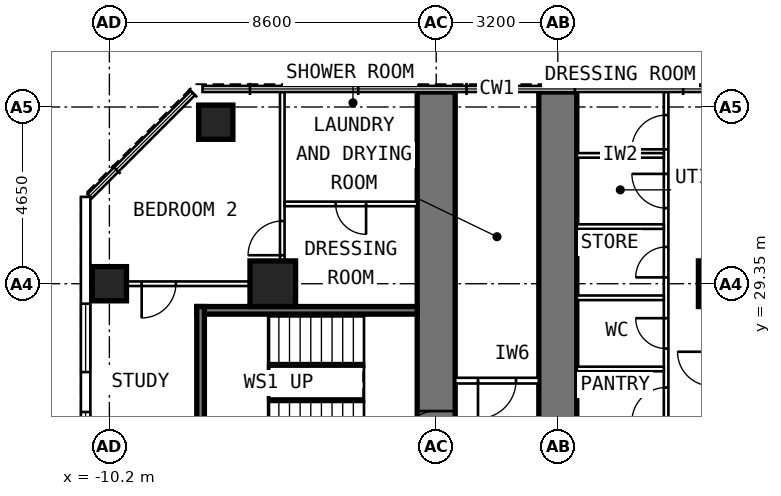
"""IFC4 building model, lengths in metres.
Left out: names, types, materials, properties, quantities, classifications, styles, units other than length and angle.
Written with IfcOpenShell. Run it as: python <this file> out.ifc"""

import sys

from ifc_helpers import new_model, si_unit, direction, frame, frame_2d, origin, origin_2d, place, context, subcontext, project, spatial, rectangle, extrude, element, fill, save


model = new_model("IFC4")
c1 = context("Model", 3, precision=1e-05, world=origin(), true_north=direction((0.0, 1.0)))
c2 = subcontext(c1, "Body", "Model", "MODEL_VIEW")
j1 = project(units=[si_unit("LENGTHUNIT", "METRE"), si_unit("PLANEANGLEUNIT", "RADIAN")], contexts=[c1])
p1 = place(None, origin())
s1 = spatial("IfcSite", under=j1, at=p1, CompositionType="ELEMENT")
p2 = place(p1, origin())
s2 = spatial("IfcBuilding", under=s1, at=p2, CompositionType="ELEMENT")
p3 = place(p2, frame((0.0, 0.0, 102.4)))
s3 = spatial("IfcBuildingStorey", under=s2, at=p3, CompositionType="ELEMENT", Elevation=102.4)
for number, where, z_axis, x_axis in (
    (1, (-10.2, 29.35, 0.0), (0.0, 0.0, 1.0), (0.0, 1.0, 0.0)),
    (2, (-7.4, 33.6, 0.0), (0.0, 0.0, 1.0), (0.0, 1.0, 0.0)),
):
    element("IfcColumn", number, at=place(p3, frame(where, z_axis=z_axis, x_axis=x_axis)), inside=s3, PredefinedType="COLUMN", context=c2, shape_type="SweptSolid", body=[
        extrude(rectangle(XDim=0.9, YDim=0.9, at=origin_2d()), origin(), (0.0, 0.0, 1.0), 3.6),
    ])
for number, where, z_axis, x_axis in (
    (3, (-5.9, 29.35, 0.0), (0.0, 0.0, 1.0), (0.0, 1.0, 0.0)),
    (4, (5.9, 29.35, 0.0), (0.0, 0.0, 1.0), (0.0, 1.0, 0.0)),
):
    element("IfcColumn", number, at=place(p3, frame(where, z_axis=z_axis, x_axis=x_axis)), inside=s3, PredefinedType="COLUMN", context=c2, shape_type="SweptSolid", body=[
        extrude(rectangle(XDim=1.2, YDim=1.2, at=origin_2d()), origin(), (0.0, 0.0, 1.0), 3.6),
    ])
p4 = place(p3, frame((-1.6, 23.65, 0.0), z_axis=(0.0, 0.0, 1.0), x_axis=(0.0, 1.0, 0.0)))
e5 = element("IfcWall", 5, at=p4, inside=s3, PredefinedType="SHEAR", context=c2, shape_type="SweptSolid", body=[
    extrude(rectangle(XDim=10.745, YDim=1.0, at=frame_2d((5.373, 0.0))), origin(), (0.0, 0.0, 1.0), 3.6),
])
p5 = place(p4, frame((1.35, 0.0, 0.0)))
e6 = element("IfcOpeningElement", 6, at=p5, cuts=e5, PredefinedType="OPENING", context=c2, shape_type="SweptSolid", body=[
    extrude(rectangle(XDim=1.0, YDim=2.1, at=frame_2d((0.5, 1.05))), frame((0.0, 0.512, 0.0), z_axis=(0.0, -1.0, 0.0), x_axis=(1.0, 0.0, 0.0)), (0.0, 0.0, 1.0), 1.024),
])
p6 = place(p3, frame((1.6, 23.65, 0.0), z_axis=(0.0, 0.0, 1.0), x_axis=(0.0, 1.0, 0.0)))
e7 = element("IfcWall", 7, at=p6, inside=s3, PredefinedType="SHEAR", context=c2, shape_type="SweptSolid", body=[
    extrude(rectangle(XDim=10.745, YDim=1.0, at=frame_2d((5.373, 0.0))), origin(), (0.0, 0.0, 1.0), 3.6),
])
p7 = place(p3, frame((-10.825, 6.148, 0.0), z_axis=(0.0, 0.0, 1.0), x_axis=(0.0, 1.0, 0.0)))
e8 = element("IfcWall", 8, at=p7, inside=s3, PredefinedType="SOLIDWALL", context=c2, shape_type="SweptSolid", body=[
    extrude(rectangle(XDim=25.487, YDim=0.25, at=frame_2d((12.744, 0.0))), origin(), (0.0, 0.0, 1.0), 3.35),
])
p8 = place(p7, frame((0.927, 0.0, 0.8)))
e9 = element("IfcOpeningElement", 9, at=p8, cuts=e8, PredefinedType="OPENING", context=c2, shape_type="SweptSolid", body=[
    extrude(rectangle(XDim=1.8, YDim=1.8, at=frame_2d((0.9, 0.9))), frame((0.0, 0.137, 0.0), z_axis=(0.0, -1.0, 0.0), x_axis=(1.0, 0.0, 0.0)), (0.0, 0.0, 1.0), 0.274),
])
p9 = place(p7, frame((3.777, 0.0, 0.8)))
e10 = element("IfcOpeningElement", 10, at=p9, cuts=e8, PredefinedType="OPENING", context=c2, shape_type="SweptSolid", body=[
    extrude(rectangle(XDim=1.8, YDim=1.8, at=frame_2d((0.9, 0.9))), frame((0.0, 0.137, 0.0), z_axis=(0.0, -1.0, 0.0), x_axis=(1.0, 0.0, 0.0)), (0.0, 0.0, 1.0), 0.274),
])
p10 = place(p7, frame((6.627, 0.0, 0.8)))
e11 = element("IfcOpeningElement", 11, at=p10, cuts=e8, PredefinedType="OPENING", context=c2, shape_type="SweptSolid", body=[
    extrude(rectangle(XDim=1.8, YDim=1.8, at=frame_2d((0.9, 0.9))), frame((0.0, 0.137, 0.0), z_axis=(0.0, -1.0, 0.0), x_axis=(1.0, 0.0, 0.0)), (0.0, 0.0, 1.0), 0.274),
])
p11 = place(p7, frame((9.477, 0.0, 0.8)))
e12 = element("IfcOpeningElement", 12, at=p11, cuts=e8, PredefinedType="OPENING", context=c2, shape_type="SweptSolid", body=[
    extrude(rectangle(XDim=1.8, YDim=1.8, at=frame_2d((0.9, 0.9))), frame((0.0, 0.137, 0.0), z_axis=(0.0, -1.0, 0.0), x_axis=(1.0, 0.0, 0.0)), (0.0, 0.0, 1.0), 0.274),
])
p12 = place(p7, frame((12.327, 0.0, 0.8)))
e13 = element("IfcOpeningElement", 13, at=p12, cuts=e8, PredefinedType="OPENING", context=c2, shape_type="SweptSolid", body=[
    extrude(rectangle(XDim=1.8, YDim=1.8, at=frame_2d((0.9, 0.9))), frame((0.0, 0.137, 0.0), z_axis=(0.0, -1.0, 0.0), x_axis=(1.0, 0.0, 0.0)), (0.0, 0.0, 1.0), 0.274),
])
p13 = place(p7, frame((15.177, 0.0, 0.8)))
e14 = element("IfcOpeningElement", 14, at=p13, cuts=e8, PredefinedType="OPENING", context=c2, shape_type="SweptSolid", body=[
    extrude(rectangle(XDim=1.8, YDim=1.8, at=frame_2d((0.9, 0.9))), frame((0.0, 0.137, 0.0), z_axis=(0.0, -1.0, 0.0), x_axis=(1.0, 0.0, 0.0)), (0.0, 0.0, 1.0), 0.274),
])
p14 = place(p7, frame((18.027, 0.0, 0.8)))
e15 = element("IfcOpeningElement", 15, at=p14, cuts=e8, PredefinedType="OPENING", context=c2, shape_type="SweptSolid", body=[
    extrude(rectangle(XDim=1.8, YDim=1.8, at=frame_2d((0.9, 0.9))), frame((0.0, 0.137, 0.0), z_axis=(0.0, -1.0, 0.0), x_axis=(1.0, 0.0, 0.0)), (0.0, 0.0, 1.0), 0.274),
])
p15 = place(p7, frame((20.877, 0.0, 0.8)))
e16 = element("IfcOpeningElement", 16, at=p15, cuts=e8, PredefinedType="OPENING", context=c2, shape_type="SweptSolid", body=[
    extrude(rectangle(XDim=1.8, YDim=1.8, at=frame_2d((0.9, 0.9))), frame((0.0, 0.137, 0.0), z_axis=(0.0, -1.0, 0.0), x_axis=(1.0, 0.0, 0.0)), (0.0, 0.0, 1.0), 0.274),
])
p16 = place(p3, frame((-5.71, 29.35, 0.0), z_axis=(0.0, 0.0, 1.0), x_axis=(-1.0, 0.0, 0.0)))
e17 = element("IfcWall", 17, at=p16, inside=s3, PredefinedType="PARTITIONING", context=c2, shape_type="SweptSolid", body=[
    extrude(rectangle(XDim=4.99, YDim=0.12, at=frame_2d((2.495, 0.0))), origin(), (0.0, 0.0, 1.0), 2.45),
])
p17 = place(p16, frame((2.74, 0.0, 0.0)))
e18 = element("IfcOpeningElement", 18, at=p17, cuts=e17, PredefinedType="OPENING", context=c2, shape_type="SweptSolid", body=[
    extrude(rectangle(XDim=0.9, YDim=2.1, at=frame_2d((0.45, 1.05))), frame((0.0, 0.072, 0.0), z_axis=(0.0, -1.0, 0.0), x_axis=(1.0, 0.0, 0.0)), (0.0, 0.0, 1.0), 0.144),
])
p18 = place(p3, frame((-5.65, 28.95, 0.0), z_axis=(0.0, 0.0, 1.0), x_axis=(0.0, 1.0, 0.0)))
e19 = element("IfcWall", 19, at=p18, inside=s3, PredefinedType="PARTITIONING", context=c2, shape_type="SweptSolid", body=[
    extrude(rectangle(XDim=5.445, YDim=0.12, at=frame_2d((2.723, 0.0))), origin(), (0.0, 0.0, 1.0), 3.35),
])
p19 = place(p18, frame((1.15, 0.0, 0.0)))
e20 = element("IfcOpeningElement", 20, at=p19, cuts=e19, PredefinedType="OPENING", context=c2, shape_type="SweptSolid", body=[
    extrude(rectangle(XDim=0.9, YDim=2.1, at=frame_2d((0.45, 1.05))), frame((0.0, 0.072, 0.0), z_axis=(0.0, -1.0, 0.0), x_axis=(1.0, 0.0, 0.0)), (0.0, 0.0, 1.0), 0.144),
])
p20 = place(p3, frame((-2.1, 31.45, 0.0), z_axis=(0.0, 0.0, 1.0), x_axis=(-1.0, 0.0, 0.0)))
e21 = element("IfcWall", 21, at=p20, inside=s3, PredefinedType="PARTITIONING", context=c2, shape_type="SweptSolid", body=[
    extrude(rectangle(XDim=3.49, YDim=0.12, at=frame_2d((1.745, 0.0))), origin(), (0.0, 0.0, 1.0), 3.35),
])
p21 = place(p20, frame((1.345, 0.0, 0.0)))
e22 = element("IfcOpeningElement", 22, at=p21, cuts=e21, PredefinedType="OPENING", context=c2, shape_type="SweptSolid", body=[
    extrude(rectangle(XDim=0.8, YDim=2.1, at=frame_2d((0.4, 1.05))), frame((0.0, 0.072, 0.0), z_axis=(0.0, -1.0, 0.0), x_axis=(1.0, 0.0, 0.0)), (0.0, 0.0, 1.0), 0.144),
])
p22 = place(p3, frame((4.45, 18.05, 0.0), z_axis=(0.0, 0.0, 1.0), x_axis=(0.0, 1.0, 0.0)))
e23 = element("IfcWall", 23, at=p22, inside=s3, PredefinedType="PARTITIONING", context=c2, shape_type="SweptSolid", body=[
    extrude(rectangle(XDim=16.345, YDim=0.12, at=frame_2d((8.172, 0.0))), origin(), (0.0, 0.0, 1.0), 3.35),
])
p23 = place(p22, frame((0.75, 0.0, 0.0)))
e24 = element("IfcOpeningElement", 24, at=p23, cuts=e23, PredefinedType="OPENING", context=c2, shape_type="SweptSolid", body=[
    extrude(rectangle(XDim=0.9, YDim=2.1, at=frame_2d((0.45, 1.05))), frame((0.0, 0.072, 0.0), z_axis=(0.0, -1.0, 0.0), x_axis=(1.0, 0.0, 0.0)), (0.0, 0.0, 1.0), 0.144),
])
p24 = place(p22, frame((3.505, 0.0, 0.0)))
e25 = element("IfcOpeningElement", 25, at=p24, cuts=e23, PredefinedType="OPENING", context=c2, shape_type="SweptSolid", body=[
    extrude(rectangle(XDim=0.8, YDim=2.1, at=frame_2d((0.4, 1.05))), frame((0.0, 0.072, 0.0), z_axis=(0.0, -1.0, 0.0), x_axis=(1.0, 0.0, 0.0)), (0.0, 0.0, 1.0), 0.144),
])
p25 = place(p22, frame((5.847, 0.0, 0.0)))
e26 = element("IfcOpeningElement", 26, at=p25, cuts=e23, PredefinedType="OPENING", context=c2, shape_type="SweptSolid", body=[
    extrude(rectangle(XDim=0.8, YDim=2.1, at=frame_2d((0.4, 1.05))), frame((0.0, 0.072, 0.0), z_axis=(0.0, -1.0, 0.0), x_axis=(1.0, 0.0, 0.0)), (0.0, 0.0, 1.0), 0.144),
])
p26 = place(p22, frame((7.67, 0.0, 0.0)))
e27 = element("IfcOpeningElement", 27, at=p26, cuts=e23, PredefinedType="OPENING", context=c2, shape_type="SweptSolid", body=[
    extrude(rectangle(XDim=0.9, YDim=2.1, at=frame_2d((0.45, 1.05))), frame((0.0, 0.072, 0.0), z_axis=(0.0, -1.0, 0.0), x_axis=(1.0, 0.0, 0.0)), (0.0, 0.0, 1.0), 0.144),
])
p27 = place(p22, frame((9.593, 0.0, 0.0)))
e28 = element("IfcOpeningElement", 28, at=p27, cuts=e23, PredefinedType="OPENING", context=c2, shape_type="SweptSolid", body=[
    extrude(rectangle(XDim=0.8, YDim=2.1, at=frame_2d((0.4, 1.05))), frame((0.0, 0.072, 0.0), z_axis=(0.0, -1.0, 0.0), x_axis=(1.0, 0.0, 0.0)), (0.0, 0.0, 1.0), 0.144),
])
p28 = place(p22, frame((11.467, 0.0, 0.0)))
e29 = element("IfcOpeningElement", 29, at=p28, cuts=e23, PredefinedType="OPENING", context=c2, shape_type="SweptSolid", body=[
    extrude(rectangle(XDim=0.8, YDim=2.1, at=frame_2d((0.4, 1.05))), frame((0.0, 0.072, 0.0), z_axis=(0.0, -1.0, 0.0), x_axis=(1.0, 0.0, 0.0)), (0.0, 0.0, 1.0), 0.144),
])
p29 = place(p22, frame((13.29, 0.0, 0.0)))
e30 = element("IfcOpeningElement", 30, at=p29, cuts=e23, PredefinedType="OPENING", context=c2, shape_type="SweptSolid", body=[
    extrude(rectangle(XDim=0.9, YDim=2.1, at=frame_2d((0.45, 1.05))), frame((0.0, 0.072, 0.0), z_axis=(0.0, -1.0, 0.0), x_axis=(1.0, 0.0, 0.0)), (0.0, 0.0, 1.0), 0.144),
])
p30 = place(p22, frame((14.837, 0.0, 0.0)))
e31 = element("IfcOpeningElement", 31, at=p30, cuts=e23, PredefinedType="OPENING", context=c2, shape_type="SweptSolid", body=[
    extrude(rectangle(XDim=0.9, YDim=2.1, at=frame_2d((0.45, 1.05))), frame((0.0, 0.072, 0.0), z_axis=(0.0, -1.0, 0.0), x_axis=(1.0, 0.0, 0.0)), (0.0, 0.0, 1.0), 0.144),
])
p31 = place(p3, frame((2.1, 27.107, 0.0), z_axis=(0.0, 0.0, 1.0), x_axis=(1.0, 0.0, 0.0)))
e32 = element("IfcWall", 32, at=p31, inside=s3, PredefinedType="PARTITIONING", context=c2, shape_type="SweptSolid", body=[
    extrude(rectangle(XDim=2.29, YDim=0.12, at=frame_2d((1.145, 0.0))), origin(), (0.0, 0.0, 1.0), 3.35),
])
p32 = place(p3, frame((2.1, 28.98, 0.0), z_axis=(0.0, 0.0, 1.0), x_axis=(1.0, 0.0, 0.0)))
e33 = element("IfcWall", 33, at=p32, inside=s3, PredefinedType="PARTITIONING", context=c2, shape_type="SweptSolid", body=[
    extrude(rectangle(XDim=2.29, YDim=0.12, at=frame_2d((1.145, 0.0))), origin(), (0.0, 0.0, 1.0), 2.45),
])
for number, where, z_axis, x_axis in (
    (34, (2.1, 30.853, 0.0), (0.0, 0.0, 1.0), (1.0, 0.0, 0.0)),
    (35, (2.1, 32.727, 0.0), (0.0, 0.0, 1.0), (1.0, 0.0, 0.0)),
):
    element("IfcWall", number, at=place(p3, frame(where, z_axis=z_axis, x_axis=x_axis)), inside=s3, PredefinedType="PARTITIONING", context=c2, shape_type="SweptSolid", body=[
        extrude(rectangle(XDim=2.29, YDim=0.12, at=frame_2d((1.145, 0.0))), origin(), (0.0, 0.0, 1.0), 3.35),
    ])
p33 = place(p3, frame((1.1, 26.8, 0.0), z_axis=(0.0, 0.0, 1.0), x_axis=(-1.0, 0.0, 0.0)))
e36 = element("IfcWall", 36, at=p33, inside=s3, PredefinedType="PARTITIONING", context=c2, shape_type="SweptSolid", body=[
    extrude(rectangle(XDim=2.2, YDim=0.15, at=frame_2d((1.1, 0.0))), origin(), (0.0, 0.0, 1.0), 3.35),
])
p34 = place(p33, frame((0.6, 0.0, 0.0)))
e37 = element("IfcOpeningElement", 37, at=p34, cuts=e36, PredefinedType="OPENING", context=c2, shape_type="SweptSolid", body=[
    extrude(rectangle(XDim=1.0, YDim=2.1, at=frame_2d((0.5, 1.05))), frame((0.0, 0.087, 0.0), z_axis=(0.0, -1.0, 0.0), x_axis=(1.0, 0.0, 0.0)), (0.0, 0.0, 1.0), 0.174),
])
p35 = place(p3, frame((-2.1, 28.65, 0.0), z_axis=(0.0, 0.0, 1.0), x_axis=(-1.0, 0.0, 0.0)))
e38 = element("IfcWall", 38, at=p35, inside=s3, PredefinedType="SHEAR", context=c2, shape_type="SweptSolid", body=[
    extrude(rectangle(XDim=5.8, YDim=0.2, at=frame_2d((2.9, 0.0))), origin(), (0.0, 0.0, 1.0), 3.33),
])
p36 = place(p3, frame((-7.8, 24.75, 0.0), z_axis=(0.0, 0.0, 1.0), x_axis=(0.0, 1.0, 0.0)))
e39 = element("IfcWall", 39, at=p36, inside=s3, PredefinedType="SHEAR", context=c2, shape_type="SweptSolid", body=[
    extrude(rectangle(XDim=4.0, YDim=0.2, at=frame_2d((2.0, 0.0))), origin(), (0.0, 0.0, 1.0), 3.33),
])
p37 = place(p14, origin())
e40 = element("IfcWindow", 40, at=p37, inside=s3, PartitioningType="SINGLE_PANEL", PredefinedType="WINDOW", context=c2, shape_type="SweptSolid", body=[
    extrude(rectangle(XDim=1.8, YDim=1.8, at=frame_2d((0.9, 0.9))), frame((0.0, 0.03, 0.0), z_axis=(0.0, -1.0, 0.0), x_axis=(1.0, 0.0, 0.0)), (0.0, 0.0, 1.0), 0.06),
])
fill(e15, e40)
p38 = place(p15, origin())
e41 = element("IfcWindow", 41, at=p38, inside=s3, PartitioningType="SINGLE_PANEL", PredefinedType="WINDOW", context=c2, shape_type="SweptSolid", body=[
    extrude(rectangle(XDim=1.8, YDim=1.8, at=frame_2d((0.9, 0.9))), frame((0.0, 0.03, 0.0), z_axis=(0.0, -1.0, 0.0), x_axis=(1.0, 0.0, 0.0)), (0.0, 0.0, 1.0), 0.06),
])
fill(e16, e41)
p39 = place(p17, origin())
e42 = element("IfcDoor", 42, at=p39, inside=s3, OperationType="SINGLE_SWING_RIGHT", PredefinedType="DOOR", context=c2, shape_type="SweptSolid", body=[
    extrude(rectangle(XDim=0.9, YDim=2.1, at=frame_2d((0.45, 1.05))), frame((0.0, 0.025, 0.0), z_axis=(0.0, -1.0, 0.0), x_axis=(1.0, 0.0, 0.0)), (0.0, 0.0, 1.0), 0.05),
])
fill(e18, e42)
p40 = place(p19, origin())
e43 = element("IfcDoor", 43, at=p40, inside=s3, OperationType="SINGLE_SWING_LEFT", PredefinedType="DOOR", context=c2, shape_type="SweptSolid", body=[
    extrude(rectangle(XDim=0.9, YDim=2.1, at=frame_2d((0.45, 1.05))), frame((0.0, 0.025, 0.0), z_axis=(0.0, -1.0, 0.0), x_axis=(1.0, 0.0, 0.0)), (0.0, 0.0, 1.0), 0.05),
])
fill(e20, e43)
p41 = place(p21, origin())
e44 = element("IfcDoor", 44, at=p41, inside=s3, OperationType="SINGLE_SWING_LEFT", PredefinedType="DOOR", context=c2, shape_type="SweptSolid", body=[
    extrude(rectangle(XDim=0.8, YDim=2.1, at=frame_2d((0.4, 1.05))), frame((0.0, 0.025, 0.0), z_axis=(0.0, -1.0, 0.0), x_axis=(1.0, 0.0, 0.0)), (0.0, 0.0, 1.0), 0.05),
])
fill(e22, e44)
p42 = place(p26, origin())
e45 = element("IfcDoor", 45, at=p42, inside=s3, OperationType="SINGLE_SWING_LEFT", PredefinedType="DOOR", context=c2, shape_type="SweptSolid", body=[
    extrude(rectangle(XDim=0.9, YDim=2.1, at=frame_2d((0.45, 1.05))), frame((0.0, 0.025, 0.0), z_axis=(0.0, -1.0, 0.0), x_axis=(1.0, 0.0, 0.0)), (0.0, 0.0, 1.0), 0.05),
])
fill(e27, e45)
p43 = place(p27, origin())
e46 = element("IfcDoor", 46, at=p43, inside=s3, OperationType="SINGLE_SWING_RIGHT", PredefinedType="DOOR", context=c2, shape_type="SweptSolid", body=[
    extrude(rectangle(XDim=0.8, YDim=2.1, at=frame_2d((0.4, 1.05))), frame((0.0, 0.025, 0.0), z_axis=(0.0, -1.0, 0.0), x_axis=(1.0, 0.0, 0.0)), (0.0, 0.0, 1.0), 0.05),
])
fill(e28, e46)
p44 = place(p28, origin())
e47 = element("IfcDoor", 47, at=p44, inside=s3, OperationType="SINGLE_SWING_LEFT", PredefinedType="DOOR", context=c2, shape_type="SweptSolid", body=[
    extrude(rectangle(XDim=0.8, YDim=2.1, at=frame_2d((0.4, 1.05))), frame((0.0, 0.025, 0.0), z_axis=(0.0, -1.0, 0.0), x_axis=(1.0, 0.0, 0.0)), (0.0, 0.0, 1.0), 0.05),
])
fill(e29, e47)
p45 = place(p29, origin())
e48 = element("IfcDoor", 48, at=p45, inside=s3, OperationType="SINGLE_SWING_RIGHT", PredefinedType="DOOR", context=c2, shape_type="SweptSolid", body=[
    extrude(rectangle(XDim=0.9, YDim=2.1, at=frame_2d((0.45, 1.05))), frame((0.0, 0.025, 0.0), z_axis=(0.0, -1.0, 0.0), x_axis=(1.0, 0.0, 0.0)), (0.0, 0.0, 1.0), 0.05),
])
fill(e30, e48)
p46 = place(p30, origin())
e49 = element("IfcDoor", 49, at=p46, inside=s3, OperationType="SINGLE_SWING_LEFT", PredefinedType="DOOR", context=c2, shape_type="SweptSolid", body=[
    extrude(rectangle(XDim=0.9, YDim=2.1, at=frame_2d((0.45, 1.05))), frame((0.0, 0.025, 0.0), z_axis=(0.0, -1.0, 0.0), x_axis=(1.0, 0.0, 0.0)), (0.0, 0.0, 1.0), 0.05),
])
fill(e31, e49)
p47 = place(p34, origin())
e50 = element("IfcDoor", 50, at=p47, inside=s3, OperationType="SINGLE_SWING_RIGHT", PredefinedType="DOOR", context=c2, shape_type="SweptSolid", body=[
    extrude(rectangle(XDim=1.0, YDim=2.1, at=frame_2d((0.5, 1.05))), frame((0.0, 0.025, 0.0), z_axis=(0.0, -1.0, 0.0), x_axis=(1.0, 0.0, 0.0)), (0.0, 0.0, 1.0), 0.05),
])
fill(e37, e50)
p48 = place(p5, origin())
e51 = element("IfcDoor", 51, at=p48, inside=s3, OperationType="SINGLE_SWING_LEFT", PredefinedType="DOOR", context=c2, shape_type="SweptSolid", body=[
    extrude(rectangle(XDim=1.0, YDim=2.1, at=frame_2d((0.5, 1.05))), frame((0.0, 0.25, 0.0), z_axis=(0.0, -1.0, 0.0), x_axis=(1.0, 0.0, 0.0)), (0.0, 0.0, 1.0), 0.5),
])
fill(e6, e51)
save(model, sys.argv[1])
